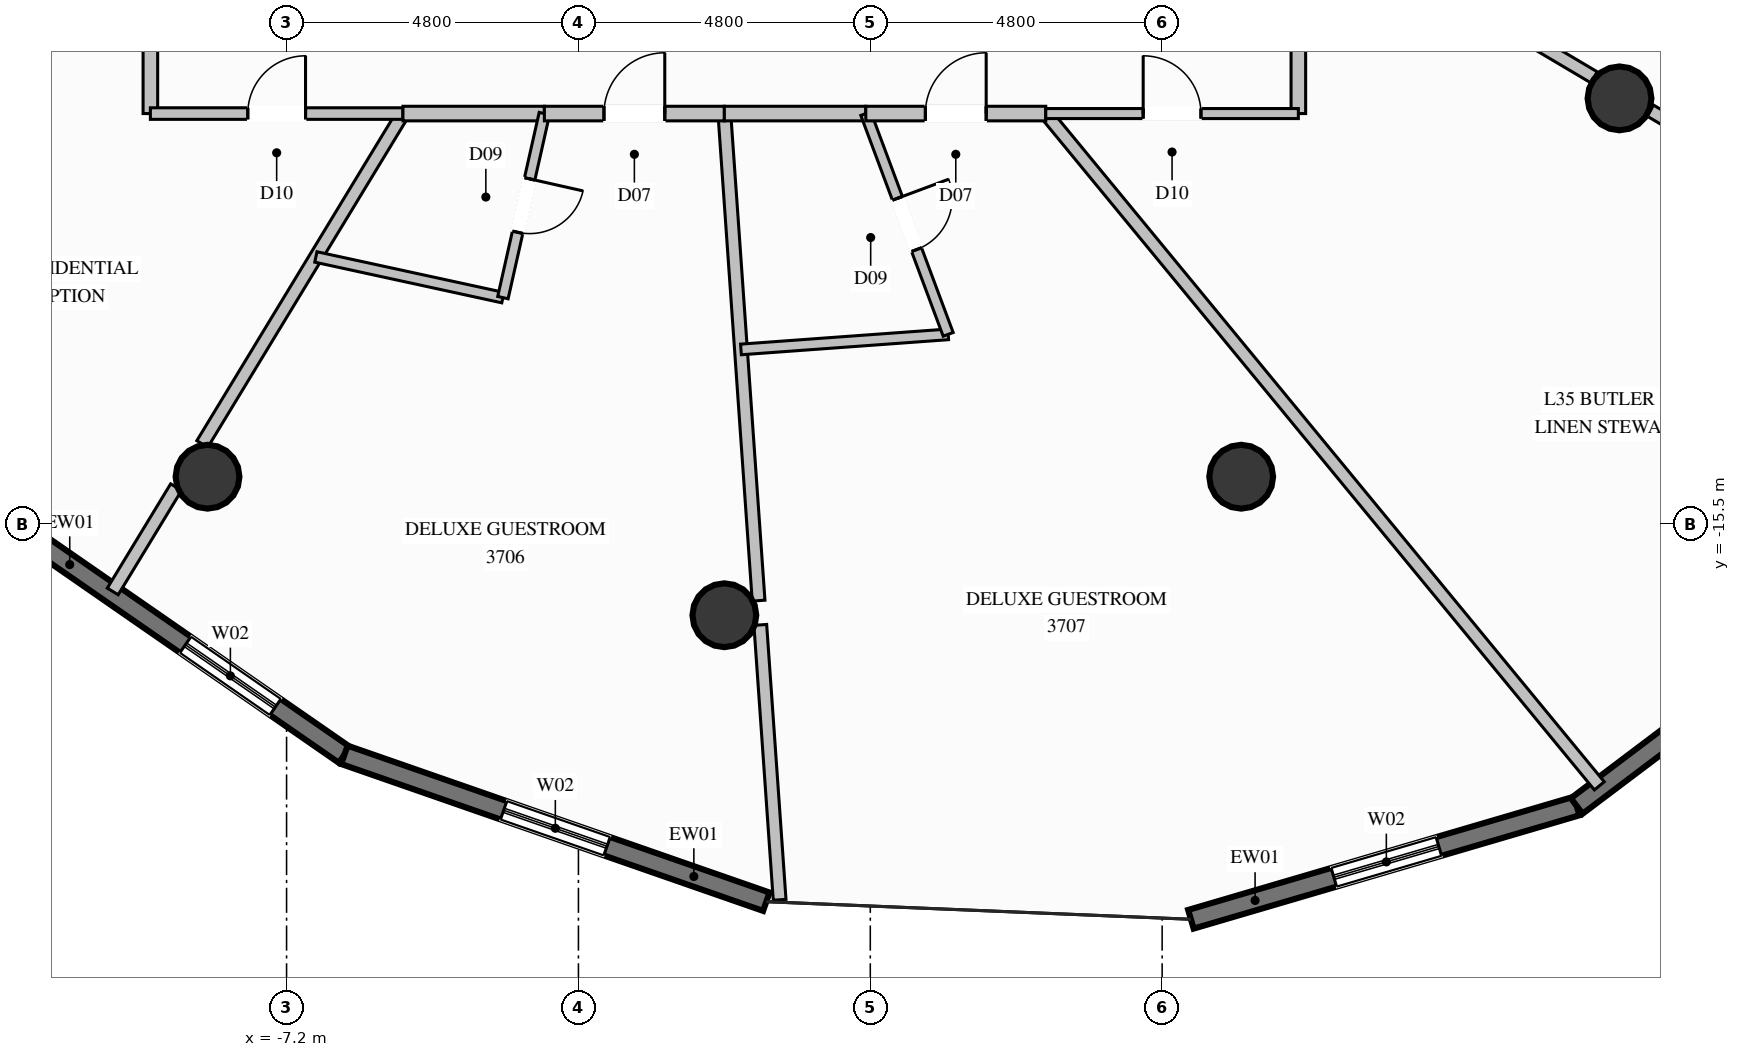
"""IFC4 building model, lengths in metres.
Left out: names, types, materials, properties, quantities, classifications, styles, units other than length and angle.
Written with IfcOpenShell. Run it as: python <this file> out.ifc"""

import sys

from ifc_helpers import new_model, si_unit, direction, frame, frame_2d, origin, origin_2d, place, context, subcontext, project, spatial, rectangle, circle, extrude, element, fill, save


model = new_model("IFC4")
c1 = context("Model", 3, precision=1e-05, world=origin(), true_north=direction((0.0, 1.0)))
c2 = subcontext(c1, "Body", "Model", "MODEL_VIEW")
j1 = project(units=[si_unit("LENGTHUNIT", "METRE"), si_unit("PLANEANGLEUNIT", "RADIAN")], contexts=[c1])
p1 = place(None, origin())
s1 = spatial("IfcSite", under=j1, at=p1, CompositionType="ELEMENT")
p2 = place(p1, origin())
s2 = spatial("IfcBuilding", under=s1, at=p2, CompositionType="ELEMENT")
p3 = place(p2, frame((0.0, 0.0, 138.6)))
s3 = spatial("IfcBuildingStorey", under=s2, at=p3, CompositionType="ELEMENT", Elevation=138.6)
for number, where, z_axis, x_axis in (
    (1, (-8.5, -14.722, 0.0), (0.0, 0.0, 1.0), (1.0, 0.0, 0.0)),
    (2, (0.0, -17.0, 0.0), (0.0, 0.0, 1.0), (1.0, 0.0, 0.0)),
    (3, (8.5, -14.722, 0.0), (0.0, 0.0, 1.0), (1.0, 0.0, 0.0)),
    (4, (14.722, -8.5, 0.0), (0.0, 0.0, 1.0), (1.0, 0.0, 0.0)),
):
    element("IfcColumn", number, at=place(p3, frame(where, z_axis=z_axis, x_axis=x_axis)), inside=s3, PredefinedType="COLUMN", context=c2, shape_type="SweptSolid", body=[
        extrude(circle(Radius=0.525, at=origin_2d()), origin(), (0.0, 0.0, 1.0), 3.6),
    ])
p4 = place(p3, frame((-6.249, -19.296, 0.0), z_axis=(0.0, 0.0, 1.0), x_axis=(-0.822065431331, 0.569393033511, 0.0)))
e5 = element("IfcWall", 5, at=p4, inside=s3, PredefinedType="SOLIDWALL", context=c2, shape_type="SweptSolid", body=[
    extrude(rectangle(XDim=7.559, YDim=0.32, at=frame_2d((3.779, 0.0))), origin(), (0.0, 0.0, 1.0), 3.35),
])
p5 = place(p4, frame((1.381, 0.0, 0.35)))
e6 = element("IfcOpeningElement", 6, at=p5, cuts=e5, PredefinedType="OPENING", context=c2, shape_type="SweptSolid", body=[
    extrude(rectangle(XDim=1.8, YDim=2.6, at=frame_2d((0.9, 1.3))), frame((0.0, 0.17, 0.0), z_axis=(0.0, -1.0, 0.0), x_axis=(1.0, 0.0, 0.0)), (0.0, 0.0, 1.0), 0.34),
])
p6 = place(p3, frame((0.69, -21.711, 0.0), z_axis=(0.0, 0.0, 1.0), x_axis=(-0.94443401985, 0.328701052859, 0.0)))
e7 = element("IfcWall", 7, at=p6, inside=s3, PredefinedType="SOLIDWALL", context=c2, shape_type="SweptSolid", body=[
    extrude(rectangle(XDim=7.347, YDim=0.32, at=frame_2d((3.674, 0.0))), origin(), (0.0, 0.0, 1.0), 3.35),
])
p7 = place(p6, frame((2.774, 0.0, 0.35)))
e8 = element("IfcOpeningElement", 8, at=p7, cuts=e7, PredefinedType="OPENING", context=c2, shape_type="SweptSolid", body=[
    extrude(rectangle(XDim=1.8, YDim=2.6, at=frame_2d((0.9, 1.3))), frame((0.0, 0.17, 0.0), z_axis=(0.0, -1.0, 0.0), x_axis=(1.0, 0.0, 0.0)), (0.0, 0.0, 1.0), 0.34),
])
p8 = place(p3, frame((14.018, -20.137, 0.0), z_axis=(0.0, 0.0, 1.0), x_axis=(-0.959493561685, -0.28173055405, 0.0)))
e9 = element("IfcWall", 9, at=p8, inside=s3, PredefinedType="SOLIDWALL", context=c2, shape_type="SweptSolid", body=[
    extrude(rectangle(XDim=6.613, YDim=0.32, at=frame_2d((3.306, 0.0))), origin(), (0.0, 0.0, 1.0), 3.35),
])
p9 = place(p8, frame((2.363, 0.0, 0.35)))
e10 = element("IfcOpeningElement", 10, at=p9, cuts=e9, PredefinedType="OPENING", context=c2, shape_type="SweptSolid", body=[
    extrude(rectangle(XDim=1.8, YDim=2.6, at=frame_2d((0.9, 1.3))), frame((0.0, 0.17, 0.0), z_axis=(0.0, -1.0, 0.0), x_axis=(1.0, 0.0, 0.0)), (0.0, 0.0, 1.0), 0.34),
])
p10 = place(p3, frame((19.103, -16.302, 0.0), z_axis=(0.0, 0.0, 1.0), x_axis=(-0.798396373417, -0.602132237067, 0.0)))
e11 = element("IfcWall", 11, at=p10, inside=s3, PredefinedType="SOLIDWALL", context=c2, shape_type="SweptSolid", body=[
    extrude(rectangle(XDim=6.369, YDim=0.32, at=frame_2d((3.185, 0.0))), origin(), (0.0, 0.0, 1.0), 3.35),
])
p11 = place(p10, frame((2.38, 0.0, 0.35)))
e12 = element("IfcOpeningElement", 12, at=p11, cuts=e11, PredefinedType="OPENING", context=c2, shape_type="SweptSolid", body=[
    extrude(rectangle(XDim=1.8, YDim=2.6, at=frame_2d((0.9, 1.3))), frame((0.0, 0.17, 0.0), z_axis=(0.0, -1.0, 0.0), x_axis=(1.0, 0.0, 0.0)), (0.0, 0.0, 1.0), 0.34),
])
p12 = place(p3, frame((-9.44, -5.275, 0.0), z_axis=(0.0, 0.0, 1.0), x_axis=(-0.857122593302, -0.515112473206, 0.0)))
e13 = element("IfcWall", 13, at=p12, inside=s3, PredefinedType="PARTITIONING", context=c2, shape_type="SweptSolid", body=[
    extrude(rectangle(XDim=5.646, YDim=0.21, at=frame_2d((2.823, 0.0))), origin(), (0.0, 0.0, 1.0), 2.791),
])
p13 = place(p3, frame((9.44, -5.275, 0.0), z_axis=(0.0, 0.0, 1.0), x_axis=(0.860527977628, -0.509403179927, 0.0)))
e14 = element("IfcWall", 14, at=p13, inside=s3, PredefinedType="PARTITIONING", context=c2, shape_type="SweptSolid", body=[
    extrude(rectangle(XDim=5.65, YDim=0.21, at=frame_2d((2.825, 0.0))), origin(), (0.0, 0.0, 1.0), 2.791),
])
p14 = place(p3, frame((15.228, -8.701, 0.0), z_axis=(0.0, 0.0, 1.0), x_axis=(0.860538050529, -0.509386163526, 0.0)))
e15 = element("IfcWall", 15, at=p14, inside=s3, PredefinedType="PARTITIONING", context=c2, shape_type="SweptSolid", body=[
    extrude(rectangle(XDim=7.236, YDim=0.21, at=frame_2d((3.618, 0.0))), origin(), (0.0, 0.0, 1.0), 3.35),
])
p15 = place(p3, frame((-5.286, -8.75, 0.0), z_axis=(0.0, 0.0, 1.0), x_axis=(-0.519068318579, -0.854732753934, 0.0)))
e16 = element("IfcWall", 16, at=p15, inside=s3, PredefinedType="PARTITIONING", context=c2, shape_type="SweptSolid", body=[
    extrude(rectangle(XDim=6.358, YDim=0.21, at=frame_2d((3.179, 0.0))), origin(), (0.0, 0.0, 1.0), 2.791),
])
p16 = place(p3, frame((-9.017, -14.894, 0.0), z_axis=(0.0, 0.0, 1.0), x_axis=(-0.51928289717, -0.854602406214, 0.0)))
e17 = element("IfcWall", 17, at=p16, inside=s3, PredefinedType="PARTITIONING", context=c2, shape_type="SweptSolid", body=[
    extrude(rectangle(XDim=2.007, YDim=0.21, at=frame_2d((1.003, 0.0))), origin(), (0.0, 0.0, 1.0), 3.35),
])
p17 = place(p3, frame((-9.44, -5.275, 0.0), z_axis=(0.0, 0.0, 1.0), x_axis=(0.0, -1.0, 0.0)))
e18 = element("IfcWall", 18, at=p17, inside=s3, PredefinedType="PARTITIONING", context=c2, shape_type="SweptSolid", body=[
    extrude(rectangle(XDim=3.475, YDim=0.24, at=frame_2d((1.738, 0.0))), origin(), (0.0, 0.0, 1.0), 3.35),
])
p18 = place(p3, frame((-9.44, -8.75, 0.0), z_axis=(0.0, 0.0, 1.0), x_axis=(1.0, 0.0, 0.0)))
e19 = element("IfcWall", 19, at=p18, inside=s3, PredefinedType="PARTITIONING", context=c2, shape_type="SweptSolid", body=[
    extrude(rectangle(XDim=4.154, YDim=0.19, at=frame_2d((2.077, 0.0))), origin(), (0.0, 0.0, 1.0), 3.35),
])
p19 = place(p18, frame((1.602, 0.0, 0.0)))
e20 = element("IfcOpeningElement", 20, at=p19, cuts=e19, PredefinedType="OPENING", context=c2, shape_type="SweptSolid", body=[
    extrude(rectangle(XDim=0.95, YDim=2.1, at=frame_2d((0.475, 1.05))), frame((0.0, 0.105, 0.0), z_axis=(0.0, -1.0, 0.0), x_axis=(1.0, 0.0, 0.0)), (0.0, 0.0, 1.0), 0.21),
])
p20 = place(p3, frame((-5.286, -8.75, 0.0), z_axis=(0.0, 0.0, 1.0), x_axis=(1.0, 0.0, 0.0)))
e21 = element("IfcWall", 21, at=p20, inside=s3, PredefinedType="PARTITIONING", context=c2, shape_type="SweptSolid", body=[
    extrude(rectangle(XDim=2.326, YDim=0.24, at=frame_2d((1.163, 0.0))), origin(), (0.0, 0.0, 1.0), 3.35),
])
p21 = place(p3, frame((-6.718, -11.108, 0.0), z_axis=(0.0, 0.0, 1.0), x_axis=(0.977142752927, -0.212584196029, 0.0)))
e22 = element("IfcWall", 22, at=p21, inside=s3, PredefinedType="PLUMBINGWALL", context=c2, shape_type="SweptSolid", body=[
    extrude(rectangle(XDim=3.148, YDim=0.175, at=frame_2d((1.574, 0.0))), origin(), (0.0, 0.0, 1.0), 3.35),
])
p22 = place(p3, frame((-2.96, -8.75, 0.0), z_axis=(0.0, 0.0, 1.0), x_axis=(-0.219828583773, -0.975538514748, 0.0)))
e23 = element("IfcWall", 23, at=p22, inside=s3, PredefinedType="PLUMBINGWALL", context=c2, shape_type="SweptSolid", body=[
    extrude(rectangle(XDim=3.103, YDim=0.175, at=frame_2d((1.552, 0.0))), origin(), (0.0, 0.0, 1.0), 3.35),
])
p23 = place(p22, frame((1.101, 0.0, 0.0)))
e24 = element("IfcOpeningElement", 24, at=p23, cuts=e23, PredefinedType="OPENING", context=c2, shape_type="SweptSolid", body=[
    extrude(rectangle(XDim=0.9, YDim=2.1, at=frame_2d((0.45, 1.05))), frame((0.0, 0.098, 0.0), z_axis=(0.0, -1.0, 0.0), x_axis=(1.0, 0.0, 0.0)), (0.0, 0.0, 1.0), 0.195),
])
p24 = place(p3, frame((0.0, -8.75, 0.0), z_axis=(0.0, 0.0, 1.0), x_axis=(0.070112625277, -0.997539081829, 0.0)))
e25 = element("IfcWall", 25, at=p24, inside=s3, PredefinedType="PARTITIONING", context=c2, shape_type="SweptSolid", body=[
    extrude(rectangle(XDim=8.03, YDim=0.21, at=frame_2d((4.015, 0.0))), origin(), (0.0, 0.0, 1.0), 2.791),
])
p25 = place(p3, frame((0.591, -17.159, 0.0), z_axis=(0.0, 0.0, 1.0), x_axis=(0.070136822004, -0.997537380853, 0.0)))
e26 = element("IfcWall", 26, at=p25, inside=s3, PredefinedType="PARTITIONING", context=c2, shape_type="SweptSolid", body=[
    extrude(rectangle(XDim=4.532, YDim=0.21, at=frame_2d((2.266, 0.0))), origin(), (0.0, 0.0, 1.0), 3.35),
])
p26 = place(p3, frame((-2.96, -8.75, 0.0), z_axis=(0.0, 0.0, 1.0), x_axis=(1.0, 0.0, 0.0)))
e27 = element("IfcWall", 27, at=p26, inside=s3, PredefinedType="PARTITIONING", context=c2, shape_type="SweptSolid", body=[
    extrude(rectangle(XDim=2.96, YDim=0.24, at=frame_2d((1.48, 0.0))), origin(), (0.0, 0.0, 1.0), 3.35),
])
p27 = place(p26, frame((0.98, 0.0, 0.0)))
e28 = element("IfcOpeningElement", 28, at=p27, cuts=e27, PredefinedType="OPENING", context=c2, shape_type="SweptSolid", body=[
    extrude(rectangle(XDim=1.0, YDim=2.2, at=frame_2d((0.5, 1.1))), frame((0.0, 0.13, 0.0), z_axis=(0.0, -1.0, 0.0), x_axis=(1.0, 0.0, 0.0)), (0.0, 0.0, 1.0), 0.26),
])
p28 = place(p3, frame((0.0, -8.75, 0.0), z_axis=(0.0, 0.0, 1.0), x_axis=(1.0, 0.0, 0.0)))
e29 = element("IfcWall", 29, at=p28, inside=s3, PredefinedType="PARTITIONING", context=c2, shape_type="SweptSolid", body=[
    extrude(rectangle(XDim=2.326, YDim=0.24, at=frame_2d((1.163, 0.0))), origin(), (0.0, 0.0, 1.0), 3.35),
])
p29 = place(p3, frame((0.273, -12.629, 0.0), z_axis=(0.0, 0.0, 1.0), x_axis=(0.997366850658, 0.07252148101, 0.0)))
e30 = element("IfcWall", 30, at=p29, inside=s3, PredefinedType="PLUMBINGWALL", context=c2, shape_type="SweptSolid", body=[
    extrude(rectangle(XDim=3.417, YDim=0.175, at=frame_2d((1.708, 0.0))), origin(), (0.0, 0.0, 1.0), 3.35),
])
p30 = place(p3, frame((2.326, -8.75, 0.0), z_axis=(0.0, 0.0, 1.0), x_axis=(0.349611151881, -0.936894894041, 0.0)))
e31 = element("IfcWall", 31, at=p30, inside=s3, PredefinedType="PLUMBINGWALL", context=c2, shape_type="SweptSolid", body=[
    extrude(rectangle(XDim=3.876, YDim=0.175, at=frame_2d((1.938, 0.0))), origin(), (0.0, 0.0, 1.0), 3.35),
])
p31 = place(p30, frame((1.488, 0.0, 0.0)))
e32 = element("IfcOpeningElement", 32, at=p31, cuts=e31, PredefinedType="OPENING", context=c2, shape_type="SweptSolid", body=[
    extrude(rectangle(XDim=0.9, YDim=2.1, at=frame_2d((0.45, 1.05))), frame((0.0, 0.098, 0.0), z_axis=(0.0, -1.0, 0.0), x_axis=(1.0, 0.0, 0.0)), (0.0, 0.0, 1.0), 0.195),
])
p32 = place(p3, frame((5.286, -8.75, 0.0), z_axis=(0.0, 0.0, 1.0), x_axis=(0.635671401386, -0.771959758964, 0.0)))
e33 = element("IfcWall", 33, at=p32, inside=s3, PredefinedType="PARTITIONING", context=c2, shape_type="SweptSolid", body=[
    extrude(rectangle(XDim=14.322, YDim=0.21, at=frame_2d((7.161, 0.0))), origin(), (0.0, 0.0, 1.0), 3.35),
])
p33 = place(p3, frame((2.326, -8.75, 0.0), z_axis=(0.0, 0.0, 1.0), x_axis=(1.0, 0.0, 0.0)))
e34 = element("IfcWall", 34, at=p33, inside=s3, PredefinedType="PARTITIONING", context=c2, shape_type="SweptSolid", body=[
    extrude(rectangle(XDim=2.96, YDim=0.24, at=frame_2d((1.48, 0.0))), origin(), (0.0, 0.0, 1.0), 3.35),
])
p34 = place(p33, frame((0.98, 0.0, 0.0)))
e35 = element("IfcOpeningElement", 35, at=p34, cuts=e34, PredefinedType="OPENING", context=c2, shape_type="SweptSolid", body=[
    extrude(rectangle(XDim=1.0, YDim=2.2, at=frame_2d((0.5, 1.1))), frame((0.0, 0.13, 0.0), z_axis=(0.0, -1.0, 0.0), x_axis=(1.0, 0.0, 0.0)), (0.0, 0.0, 1.0), 0.26),
])
p35 = place(p3, frame((9.44, -8.75, 0.0), z_axis=(0.0, 0.0, 1.0), x_axis=(0.0, 1.0, 0.0)))
e36 = element("IfcWall", 36, at=p35, inside=s3, PredefinedType="PARTITIONING", context=c2, shape_type="SweptSolid", body=[
    extrude(rectangle(XDim=3.475, YDim=0.24, at=frame_2d((1.738, 0.0))), origin(), (0.0, 0.0, 1.0), 3.35),
])
p36 = place(p3, frame((5.286, -8.75, 0.0), z_axis=(0.0, 0.0, 1.0), x_axis=(1.0, 0.0, 0.0)))
e37 = element("IfcWall", 37, at=p36, inside=s3, PredefinedType="PARTITIONING", context=c2, shape_type="SweptSolid", body=[
    extrude(rectangle(XDim=4.154, YDim=0.165, at=frame_2d((2.077, 0.0))), origin(), (0.0, 0.0, 1.0), 3.35),
])
p37 = place(p36, frame((1.602, 0.0, 0.0)))
e38 = element("IfcOpeningElement", 38, at=p37, cuts=e37, PredefinedType="OPENING", context=c2, shape_type="SweptSolid", body=[
    extrude(rectangle(XDim=0.95, YDim=2.1, at=frame_2d((0.475, 1.05))), frame((0.0, 0.093, 0.0), z_axis=(0.0, -1.0, 0.0), x_axis=(1.0, 0.0, 0.0)), (0.0, 0.0, 1.0), 0.185),
])
p38 = place(p5, origin())
e39 = element("IfcWindow", 39, at=p38, inside=s3, PartitioningType="SINGLE_PANEL", PredefinedType="WINDOW", context=c2, shape_type="SweptSolid", body=[
    extrude(rectangle(XDim=1.8, YDim=2.6, at=frame_2d((0.9, 1.3))), frame((0.0, 0.03, 0.0), z_axis=(0.0, -1.0, 0.0), x_axis=(1.0, 0.0, 0.0)), (0.0, 0.0, 1.0), 0.06),
])
fill(e6, e39)
p39 = place(p7, origin())
e40 = element("IfcWindow", 40, at=p39, inside=s3, PartitioningType="SINGLE_PANEL", PredefinedType="WINDOW", context=c2, shape_type="SweptSolid", body=[
    extrude(rectangle(XDim=1.8, YDim=2.6, at=frame_2d((0.9, 1.3))), frame((0.0, 0.03, 0.0), z_axis=(0.0, -1.0, 0.0), x_axis=(1.0, 0.0, 0.0)), (0.0, 0.0, 1.0), 0.06),
])
fill(e8, e40)
p40 = place(p9, origin())
e41 = element("IfcWindow", 41, at=p40, inside=s3, PartitioningType="SINGLE_PANEL", PredefinedType="WINDOW", context=c2, shape_type="SweptSolid", body=[
    extrude(rectangle(XDim=1.8, YDim=2.6, at=frame_2d((0.9, 1.3))), frame((0.0, 0.03, 0.0), z_axis=(0.0, -1.0, 0.0), x_axis=(1.0, 0.0, 0.0)), (0.0, 0.0, 1.0), 0.06),
])
fill(e10, e41)
p41 = place(p19, origin())
e42 = element("IfcDoor", 42, at=p41, inside=s3, OperationType="SINGLE_SWING_RIGHT", PredefinedType="DOOR", context=c2, shape_type="SweptSolid", body=[
    extrude(rectangle(XDim=0.95, YDim=2.1, at=frame_2d((0.475, 1.05))), frame((0.0, 0.025, 0.0), z_axis=(0.0, -1.0, 0.0), x_axis=(1.0, 0.0, 0.0)), (0.0, 0.0, 1.0), 0.05),
])
fill(e20, e42)
p42 = place(p23, origin())
e43 = element("IfcDoor", 43, at=p42, inside=s3, OperationType="SINGLE_SWING_LEFT", PredefinedType="DOOR", context=c2, shape_type="SweptSolid", body=[
    extrude(rectangle(XDim=0.9, YDim=2.1, at=frame_2d((0.45, 1.05))), frame((0.0, 0.025, 0.0), z_axis=(0.0, -1.0, 0.0), x_axis=(1.0, 0.0, 0.0)), (0.0, 0.0, 1.0), 0.05),
])
fill(e24, e43)
p43 = place(p27, origin())
e44 = element("IfcDoor", 44, at=p43, inside=s3, OperationType="SINGLE_SWING_RIGHT", PredefinedType="DOOR", context=c2, shape_type="SweptSolid", body=[
    extrude(rectangle(XDim=1.0, YDim=2.2, at=frame_2d((0.5, 1.1))), frame((0.0, 0.025, 0.0), z_axis=(0.0, -1.0, 0.0), x_axis=(1.0, 0.0, 0.0)), (0.0, 0.0, 1.0), 0.05),
])
fill(e28, e44)
p44 = place(p31, origin())
e45 = element("IfcDoor", 45, at=p44, inside=s3, OperationType="SINGLE_SWING_LEFT", PredefinedType="DOOR", context=c2, shape_type="SweptSolid", body=[
    extrude(rectangle(XDim=0.9, YDim=2.1, at=frame_2d((0.45, 1.05))), frame((0.0, 0.025, 0.0), z_axis=(0.0, -1.0, 0.0), x_axis=(1.0, 0.0, 0.0)), (0.0, 0.0, 1.0), 0.05),
])
fill(e32, e45)
p45 = place(p34, origin())
e46 = element("IfcDoor", 46, at=p45, inside=s3, OperationType="SINGLE_SWING_RIGHT", PredefinedType="DOOR", context=c2, shape_type="SweptSolid", body=[
    extrude(rectangle(XDim=1.0, YDim=2.2, at=frame_2d((0.5, 1.1))), frame((0.0, 0.025, 0.0), z_axis=(0.0, -1.0, 0.0), x_axis=(1.0, 0.0, 0.0)), (0.0, 0.0, 1.0), 0.05),
])
fill(e35, e46)
p46 = place(p37, origin())
e47 = element("IfcDoor", 47, at=p46, inside=s3, OperationType="SINGLE_SWING_LEFT", PredefinedType="DOOR", context=c2, shape_type="SweptSolid", body=[
    extrude(rectangle(XDim=0.95, YDim=2.1, at=frame_2d((0.475, 1.05))), frame((0.0, 0.025, 0.0), z_axis=(0.0, -1.0, 0.0), x_axis=(1.0, 0.0, 0.0)), (0.0, 0.0, 1.0), 0.05),
])
fill(e38, e47)
save(model, sys.argv[1])
